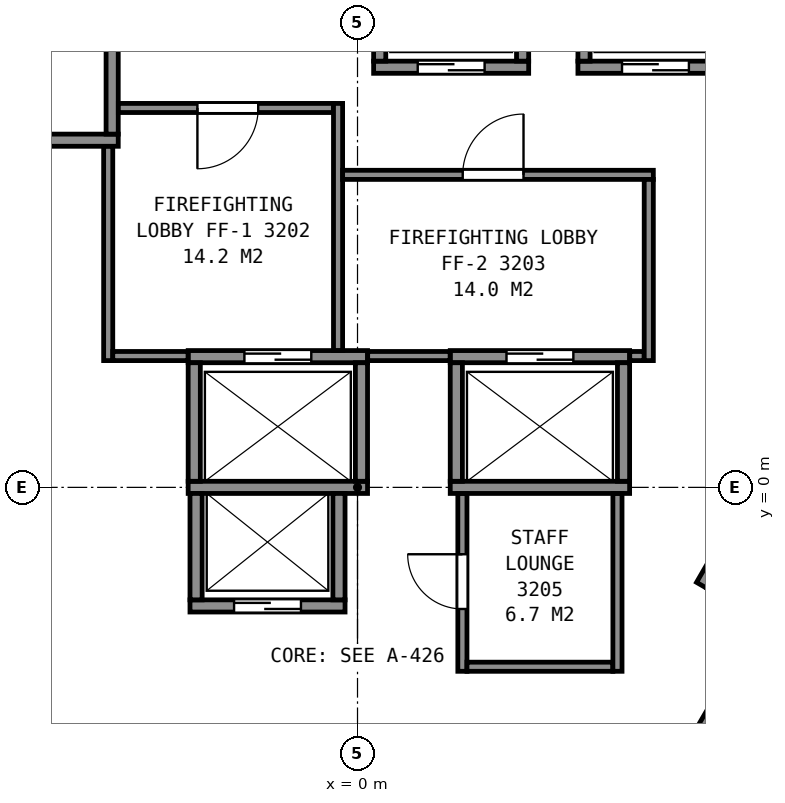
"""IFC4 building model, lengths in metres.
Left out: names, types, materials, properties, quantities, classifications, styles, units other than length and angle.
Written with IfcOpenShell. Run it as: python <this file> out.ifc"""

import sys

from ifc_helpers import new_model, si_unit, direction, frame, frame_2d, origin, place, context, subcontext, project, spatial, rectangle, extrude, element, fill, save


model = new_model("IFC4")
c1 = context("Model", 3, precision=1e-05, world=origin(), true_north=direction((0.0, 1.0)))
c2 = subcontext(c1, "Body", "Model", "MODEL_VIEW")
j1 = project(units=[si_unit("LENGTHUNIT", "METRE"), si_unit("PLANEANGLEUNIT", "RADIAN")], contexts=[c1])
p1 = place(None, origin())
s1 = spatial("IfcSite", under=j1, at=p1, CompositionType="ELEMENT")
p2 = place(p1, origin())
s2 = spatial("IfcBuilding", under=s1, at=p2, CompositionType="ELEMENT")
p3 = place(p2, frame((0.0, 0.0, 132.4)))
s3 = spatial("IfcBuildingStorey", under=s2, at=p3, CompositionType="ELEMENT", Elevation=132.4)
p4 = place(p3, frame((-2.755, -1.95, 0.0), z_axis=(0.0, 0.0, 1.0), x_axis=(1.0, 0.0, 0.0)))
e1 = element("IfcWall", 1, at=p4, inside=s3, PredefinedType="PARTITIONING", context=c2, shape_type="SweptSolid", body=[
    extrude(rectangle(XDim=2.55, YDim=0.2, at=frame_2d((1.275, 0.0))), origin(), (0.0, 0.0, 1.0), 3.6),
])
p5 = place(p4, frame((0.725, 0.0, 0.0)))
e2 = element("IfcOpeningElement", 2, at=p5, cuts=e1, PredefinedType="OPENING", context=c2, shape_type="SweptSolid", body=[
    extrude(rectangle(XDim=1.1, YDim=2.1, at=frame_2d((0.55, 1.05))), frame((0.0, 0.11, 0.0), z_axis=(0.0, -1.0, 0.0), x_axis=(1.0, 0.0, 0.0)), (0.0, 0.0, 1.0), 0.22),
])
p6 = place(p3, frame((-2.785, 0.0, 0.0), z_axis=(0.0, 0.0, 1.0), x_axis=(1.0, 0.0, 0.0)))
e3 = element("IfcWall", 3, at=p6, inside=s3, PredefinedType="PARTITIONING", context=c2, shape_type="SweptSolid", body=[
    extrude(rectangle(XDim=2.95, YDim=0.2, at=frame_2d((1.475, 0.0))), origin(), (0.0, 0.0, 1.0), 3.6),
])
p7 = place(p3, frame((1.525, 0.0, 0.0), z_axis=(0.0, 0.0, 1.0), x_axis=(1.0, 0.0, 0.0)))
e4 = element("IfcWall", 4, at=p7, inside=s3, PredefinedType="PARTITIONING", context=c2, shape_type="SweptSolid", body=[
    extrude(rectangle(XDim=2.95, YDim=0.2, at=frame_2d((1.475, 0.0))), origin(), (0.0, 0.0, 1.0), 3.6),
])
p8 = place(p3, frame((-2.785, 2.15, 0.0), z_axis=(0.0, 0.0, 1.0), x_axis=(1.0, 0.0, 0.0)))
e5 = element("IfcWall", 5, at=p8, inside=s3, PredefinedType="PARTITIONING", context=c2, shape_type="SweptSolid", body=[
    extrude(rectangle(XDim=2.95, YDim=0.2, at=frame_2d((1.475, 0.0))), origin(), (0.0, 0.0, 1.0), 3.6),
])
p9 = place(p8, frame((0.925, 0.0, 0.0)))
e6 = element("IfcOpeningElement", 6, at=p9, cuts=e5, PredefinedType="OPENING", context=c2, shape_type="SweptSolid", body=[
    extrude(rectangle(XDim=1.1, YDim=2.1, at=frame_2d((0.55, 1.05))), frame((0.0, 0.11, 0.0), z_axis=(0.0, -1.0, 0.0), x_axis=(1.0, 0.0, 0.0)), (0.0, 0.0, 1.0), 0.22),
])
p10 = place(p3, frame((1.525, 2.15, 0.0), z_axis=(0.0, 0.0, 1.0), x_axis=(1.0, 0.0, 0.0)))
e7 = element("IfcWall", 7, at=p10, inside=s3, PredefinedType="PARTITIONING", context=c2, shape_type="SweptSolid", body=[
    extrude(rectangle(XDim=2.95, YDim=0.2, at=frame_2d((1.475, 0.0))), origin(), (0.0, 0.0, 1.0), 3.6),
])
p11 = place(p10, frame((0.925, 0.0, 0.0)))
e8 = element("IfcOpeningElement", 8, at=p11, cuts=e7, PredefinedType="OPENING", context=c2, shape_type="SweptSolid", body=[
    extrude(rectangle(XDim=1.1, YDim=2.1, at=frame_2d((0.55, 1.05))), frame((0.0, 0.11, 0.0), z_axis=(0.0, -1.0, 0.0), x_axis=(1.0, 0.0, 0.0)), (0.0, 0.0, 1.0), 0.22),
])
p12 = place(p3, frame((-6.285, 5.71, 0.0), z_axis=(0.0, 0.0, 1.0), x_axis=(1.0, 0.0, 0.0)))
e9 = element("IfcWall", 9, at=p12, inside=s3, PredefinedType="PARTITIONING", context=c2, shape_type="SweptSolid", body=[
    extrude(rectangle(XDim=2.35, YDim=0.2, at=frame_2d((1.175, 0.0))), origin(), (0.0, 0.0, 1.0), 3.6),
])
p13 = place(p3, frame((0.265, 6.91, 0.0), z_axis=(0.0, 0.0, 1.0), x_axis=(1.0, 0.0, 0.0)))
e10 = element("IfcWall", 10, at=p13, inside=s3, PredefinedType="PARTITIONING", context=c2, shape_type="SweptSolid", body=[
    extrude(rectangle(XDim=2.55, YDim=0.2, at=frame_2d((1.275, 0.0))), origin(), (0.0, 0.0, 1.0), 3.6),
])
p14 = place(p13, frame((0.725, 0.0, 0.0)))
e11 = element("IfcOpeningElement", 11, at=p14, cuts=e10, PredefinedType="OPENING", context=c2, shape_type="SweptSolid", body=[
    extrude(rectangle(XDim=1.1, YDim=2.1, at=frame_2d((0.55, 1.05))), frame((0.0, 0.11, 0.0), z_axis=(0.0, -1.0, 0.0), x_axis=(1.0, 0.0, 0.0)), (0.0, 0.0, 1.0), 0.22),
])
p15 = place(p3, frame((3.625, 6.91, 0.0), z_axis=(0.0, 0.0, 1.0), x_axis=(1.0, 0.0, 0.0)))
e12 = element("IfcWall", 12, at=p15, inside=s3, PredefinedType="PARTITIONING", context=c2, shape_type="SweptSolid", body=[
    extrude(rectangle(XDim=2.55, YDim=0.2, at=frame_2d((1.275, 0.0))), origin(), (0.0, 0.0, 1.0), 3.6),
])
p16 = place(p15, frame((0.725, 0.0, 0.0)))
e13 = element("IfcOpeningElement", 13, at=p16, cuts=e12, PredefinedType="OPENING", context=c2, shape_type="SweptSolid", body=[
    extrude(rectangle(XDim=1.1, YDim=2.1, at=frame_2d((0.55, 1.05))), frame((0.0, 0.11, 0.0), z_axis=(0.0, -1.0, 0.0), x_axis=(1.0, 0.0, 0.0)), (0.0, 0.0, 1.0), 0.22),
])
p17 = place(p3, frame((5.527, -4.247, 0.0), z_axis=(0.0, 0.0, 1.0), x_axis=(0.499938297808, 0.866061024631, 0.0)))
e14 = element("IfcWall", 14, at=p17, inside=s3, PredefinedType="PARTITIONING", context=c2, shape_type="SweptSolid", body=[
    extrude(rectangle(XDim=2.35, YDim=0.2, at=frame_2d((1.175, 0.0))), origin(), (0.0, 0.0, 1.0), 3.6),
])
p18 = place(p17, frame((0.725, 0.0, 0.0)))
e15 = element("IfcOpeningElement", 15, at=p18, cuts=e14, PredefinedType="OPENING", context=c2, shape_type="SweptSolid", body=[
    extrude(rectangle(XDim=1.1, YDim=2.1, at=frame_2d((0.55, 1.05))), frame((0.0, 0.11, 0.0), z_axis=(0.0, -1.0, 0.0), x_axis=(1.0, 0.0, 0.0)), (0.0, 0.0, 1.0), 0.22),
])
p19 = place(p3, frame((5.663, -1.612, 0.0), z_axis=(0.0, 0.0, 1.0), x_axis=(0.49998122708, 0.866036242063, 0.0)))
e16 = element("IfcWall", 16, at=p19, inside=s3, PredefinedType="PARTITIONING", context=c2, shape_type="SweptSolid", body=[
    extrude(rectangle(XDim=4.9, YDim=0.2, at=frame_2d((2.45, 0.0))), origin(), (0.0, 0.0, 1.0), 3.6),
])
p20 = place(p3, frame((4.375, 0.1, 0.0), z_axis=(0.0, 0.0, 1.0), x_axis=(0.0, 1.0, 0.0)))
e17 = element("IfcWall", 17, at=p20, inside=s3, PredefinedType="PARTITIONING", context=c2, shape_type="SweptSolid", body=[
    extrude(rectangle(XDim=1.95, YDim=0.2, at=frame_2d((0.975, 0.0))), origin(), (0.0, 0.0, 1.0), 3.6),
])
for number, where, z_axis, x_axis in (
    (18, (3.725, 7.01, 0.0), (0.0, 0.0, 1.0), (0.0, 1.0, 0.0)),
    (19, (2.715, 7.01, 0.0), (0.0, 0.0, 1.0), (0.0, 1.0, 0.0)),
):
    element("IfcWall", number, at=place(p3, frame(where, z_axis=z_axis, x_axis=x_axis)), inside=s3, PredefinedType="PARTITIONING", context=c2, shape_type="SweptSolid", body=[
        extrude(rectangle(XDim=1.75, YDim=0.2, at=frame_2d((0.875, 0.0))), origin(), (0.0, 0.0, 1.0), 3.6),
    ])
p21 = place(p3, frame((1.625, 0.1, 0.0), z_axis=(0.0, 0.0, 1.0), x_axis=(0.0, 1.0, 0.0)))
e20 = element("IfcWall", 20, at=p21, inside=s3, PredefinedType="PARTITIONING", context=c2, shape_type="SweptSolid", body=[
    extrude(rectangle(XDim=1.95, YDim=0.2, at=frame_2d((0.975, 0.0))), origin(), (0.0, 0.0, 1.0), 3.6),
])
p22 = place(p3, frame((0.365, 7.01, 0.0), z_axis=(0.0, 0.0, 1.0), x_axis=(0.0, 1.0, 0.0)))
e21 = element("IfcWall", 21, at=p22, inside=s3, PredefinedType="PARTITIONING", context=c2, shape_type="SweptSolid", body=[
    extrude(rectangle(XDim=1.75, YDim=0.2, at=frame_2d((0.875, 0.0))), origin(), (0.0, 0.0, 1.0), 3.6),
])
p23 = place(p3, frame((0.065, 0.1, 0.0), z_axis=(0.0, 0.0, 1.0), x_axis=(0.0, 1.0, 0.0)))
e22 = element("IfcWall", 22, at=p23, inside=s3, PredefinedType="PARTITIONING", context=c2, shape_type="SweptSolid", body=[
    extrude(rectangle(XDim=1.95, YDim=0.2, at=frame_2d((0.975, 0.0))), origin(), (0.0, 0.0, 1.0), 3.6),
])
for number, where, z_axis, x_axis in (
    (23, (-0.305, -1.85, 0.0), (0.0, 0.0, 1.0), (0.0, 1.0, 0.0)),
    (24, (-2.655, -1.85, 0.0), (0.0, 0.0, 1.0), (0.0, 1.0, 0.0)),
):
    element("IfcWall", number, at=place(p3, frame(where, z_axis=z_axis, x_axis=x_axis)), inside=s3, PredefinedType="PARTITIONING", context=c2, shape_type="SweptSolid", body=[
        extrude(rectangle(XDim=1.75, YDim=0.2, at=frame_2d((0.875, 0.0))), origin(), (0.0, 0.0, 1.0), 3.6),
    ])
p24 = place(p3, frame((-2.685, 0.1, 0.0), z_axis=(0.0, 0.0, 1.0), x_axis=(0.0, 1.0, 0.0)))
e25 = element("IfcWall", 25, at=p24, inside=s3, PredefinedType="PARTITIONING", context=c2, shape_type="SweptSolid", body=[
    extrude(rectangle(XDim=1.95, YDim=0.2, at=frame_2d((0.975, 0.0))), origin(), (0.0, 0.0, 1.0), 3.6),
])
p25 = place(p3, frame((-4.035, 5.81, 0.0), z_axis=(0.0, 0.0, 1.0), x_axis=(0.0, 1.0, 0.0)))
e26 = element("IfcWall", 26, at=p25, inside=s3, PredefinedType="PARTITIONING", context=c2, shape_type="SweptSolid", body=[
    extrude(rectangle(XDim=1.75, YDim=0.2, at=frame_2d((0.875, 0.0))), origin(), (0.0, 0.0, 1.0), 3.6),
])
p26 = place(p3, frame((-13.664, 5.946, 0.0), z_axis=(0.0, 0.0, 1.0), x_axis=(0.499994327219, -0.866028678941, 0.0)))
e27 = element("IfcWall", 27, at=p26, inside=s3, PredefinedType="PARTITIONING", context=c2, shape_type="SweptSolid", body=[
    extrude(rectangle(XDim=23.968, YDim=0.2, at=frame_2d((11.984, 0.0))), origin(), (0.0, 0.0, 1.0), 3.35),
])
p27 = place(p3, frame((-4.152, -5.729, 0.0), z_axis=(0.0, 0.0, 1.0), x_axis=(-0.500024287448, 0.866011380966, 0.0)))
e28 = element("IfcWall", 28, at=p27, inside=s3, PredefinedType="PARTITIONING", context=c2, shape_type="SweptSolid", body=[
    extrude(rectangle(XDim=3.501, YDim=0.15, at=frame_2d((1.75, 0.0))), origin(), (0.0, 0.0, 1.0), 3.35),
])
p28 = place(p27, frame((2.026, 0.0, 0.0)))
e29 = element("IfcOpeningElement", 29, at=p28, cuts=e28, PredefinedType="OPENING", context=c2, shape_type="SweptSolid", body=[
    extrude(rectangle(XDim=0.9, YDim=2.1, at=frame_2d((0.45, 1.05))), frame((0.0, 0.085, 0.0), z_axis=(0.0, -1.0, 0.0), x_axis=(1.0, 0.0, 0.0)), (0.0, 0.0, 1.0), 0.17),
])
p29 = place(p27, frame((0.248, 0.0, 0.0)))
e30 = element("IfcOpeningElement", 30, at=p29, cuts=e28, PredefinedType="OPENING", context=c2, shape_type="SweptSolid", body=[
    extrude(rectangle(XDim=0.9, YDim=2.1, at=frame_2d((0.45, 1.05))), frame((0.0, 0.085, 0.0), z_axis=(0.0, -1.0, 0.0), x_axis=(1.0, 0.0, 0.0)), (0.0, 0.0, 1.0), 0.17),
])
p30 = place(p3, frame((-4.1, 2.085, 0.0), z_axis=(0.0, 0.0, 1.0), x_axis=(0.0, 1.0, 0.0)))
e31 = element("IfcWall", 31, at=p30, inside=s3, PredefinedType="PARTITIONING", context=c2, shape_type="SweptSolid", body=[
    extrude(rectangle(XDim=3.523, YDim=0.15, at=frame_2d((1.761, 0.0))), origin(), (0.0, 0.0, 1.0), 3.35),
])
p31 = place(p3, frame((-4.025, 2.16, 0.0), z_axis=(0.0, 0.0, 1.0), x_axis=(1.0, 0.0, 0.0)))
e32 = element("IfcWall", 32, at=p31, inside=s3, PredefinedType="PARTITIONING", context=c2, shape_type="SweptSolid", body=[
    extrude(rectangle(XDim=1.238, YDim=0.15, at=frame_2d((0.619, 0.0))), origin(), (0.0, 0.0, 1.0), 3.35),
])
p32 = place(p3, frame((-3.933, 6.24, 0.0), z_axis=(0.0, 0.0, 1.0), x_axis=(1.0, 0.0, 0.0)))
e33 = element("IfcWall", 33, at=p32, inside=s3, PredefinedType="PARTITIONING", context=c2, shape_type="SweptSolid", body=[
    extrude(rectangle(XDim=3.538, YDim=0.15, at=frame_2d((1.769, 0.0))), origin(), (0.0, 0.0, 1.0), 3.35),
])
p33 = place(p32, frame((1.3, 0.0, 0.0)))
e34 = element("IfcOpeningElement", 34, at=p33, cuts=e33, PredefinedType="OPENING", context=c2, shape_type="SweptSolid", body=[
    extrude(rectangle(XDim=1.0, YDim=2.1, at=frame_2d((0.5, 1.05))), frame((0.0, 0.085, 0.0), z_axis=(0.0, -1.0, 0.0), x_axis=(1.0, 0.0, 0.0)), (0.0, 0.0, 1.0), 0.17),
])
p34 = place(p3, frame((-0.32, 2.252, 0.0), z_axis=(0.0, 0.0, 1.0), x_axis=(0.0, 1.0, 0.0)))
e35 = element("IfcWall", 35, at=p34, inside=s3, PredefinedType="PARTITIONING", context=c2, shape_type="SweptSolid", body=[
    extrude(rectangle(XDim=4.063, YDim=0.15, at=frame_2d((2.031, 0.0))), origin(), (0.0, 0.0, 1.0), 3.35),
])
p35 = place(p3, frame((-0.245, 5.14, 0.0), z_axis=(0.0, 0.0, 1.0), x_axis=(1.0, 0.0, 0.0)))
e36 = element("IfcWall", 36, at=p35, inside=s3, PredefinedType="PARTITIONING", context=c2, shape_type="SweptSolid", body=[
    extrude(rectangle(XDim=5.11, YDim=0.15, at=frame_2d((2.555, 0.0))), origin(), (0.0, 0.0, 1.0), 3.35),
])
p36 = place(p35, frame((1.975, 0.0, 0.0)))
e37 = element("IfcOpeningElement", 37, at=p36, cuts=e36, PredefinedType="OPENING", context=c2, shape_type="SweptSolid", body=[
    extrude(rectangle(XDim=1.0, YDim=2.1, at=frame_2d((0.5, 1.05))), frame((0.0, 0.085, 0.0), z_axis=(0.0, -1.0, 0.0), x_axis=(1.0, 0.0, 0.0)), (0.0, 0.0, 1.0), 0.17),
])
p37 = place(p3, frame((0.167, 2.16, 0.0), z_axis=(0.0, 0.0, 1.0), x_axis=(1.0, 0.0, 0.0)))
e38 = element("IfcWall", 38, at=p37, inside=s3, PredefinedType="PARTITIONING", context=c2, shape_type="SweptSolid", body=[
    extrude(rectangle(XDim=1.356, YDim=0.15, at=frame_2d((0.678, 0.0))), origin(), (0.0, 0.0, 1.0), 3.35),
])
p38 = place(p3, frame((1.725, -0.102, 0.0), z_axis=(0.0, 0.0, 1.0), x_axis=(0.0, -1.0, 0.0)))
e39 = element("IfcWall", 39, at=p38, inside=s3, PredefinedType="PARTITIONING", context=c2, shape_type="SweptSolid", body=[
    extrude(rectangle(XDim=2.923, YDim=0.15, at=frame_2d((1.461, 0.0))), origin(), (0.0, 0.0, 1.0), 3.35),
])
p39 = place(p38, frame((0.998, 0.0, 0.0)))
e40 = element("IfcOpeningElement", 40, at=p39, cuts=e39, PredefinedType="OPENING", context=c2, shape_type="SweptSolid", body=[
    extrude(rectangle(XDim=0.9, YDim=2.1, at=frame_2d((0.45, 1.05))), frame((0.0, 0.085, 0.0), z_axis=(0.0, -1.0, 0.0), x_axis=(1.0, 0.0, 0.0)), (0.0, 0.0, 1.0), 0.17),
])
p40 = place(p3, frame((1.8, -2.95, 0.0), z_axis=(0.0, 0.0, 1.0), x_axis=(1.0, 0.0, 0.0)))
e41 = element("IfcWall", 41, at=p40, inside=s3, PredefinedType="PARTITIONING", context=c2, shape_type="SweptSolid", body=[
    extrude(rectangle(XDim=2.4, YDim=0.15, at=frame_2d((1.2, 0.0))), origin(), (0.0, 0.0, 1.0), 3.35),
])
p41 = place(p3, frame((4.275, -3.025, 0.0), z_axis=(0.0, 0.0, 1.0), x_axis=(0.0, 1.0, 0.0)))
e42 = element("IfcWall", 42, at=p41, inside=s3, PredefinedType="PARTITIONING", context=c2, shape_type="SweptSolid", body=[
    extrude(rectangle(XDim=2.923, YDim=0.15, at=frame_2d((1.461, 0.0))), origin(), (0.0, 0.0, 1.0), 3.35),
])
p42 = place(p3, frame((4.477, 2.16, 0.0), z_axis=(0.0, 0.0, 1.0), x_axis=(1.0, 0.0, 0.0)))
e43 = element("IfcWall", 43, at=p42, inside=s3, PredefinedType="PARTITIONING", context=c2, shape_type="SweptSolid", body=[
    extrude(rectangle(XDim=0.238, YDim=0.15, at=frame_2d((0.119, 0.0))), origin(), (0.0, 0.0, 1.0), 3.35),
])
p43 = place(p3, frame((4.79, 2.085, 0.0), z_axis=(0.0, 0.0, 1.0), x_axis=(0.0, 1.0, 0.0)))
e44 = element("IfcWall", 44, at=p43, inside=s3, PredefinedType="PARTITIONING", context=c2, shape_type="SweptSolid", body=[
    extrude(rectangle(XDim=2.98, YDim=0.15, at=frame_2d((1.49, 0.0))), origin(), (0.0, 0.0, 1.0), 3.35),
])
p44 = place(p3, frame((-3.756, -15.816, 0.0), z_axis=(0.0, 0.0, 1.0), x_axis=(-0.499992829944, 0.866029543379, 0.0)))
e45 = element("IfcWall", 45, at=p44, inside=s3, PredefinedType="PARTITIONING", context=c2, shape_type="SweptSolid", body=[
    extrude(rectangle(XDim=24.413, YDim=0.125, at=frame_2d((12.207, 0.0))), origin(), (0.0, 0.0, 1.0), 2.613),
])
p45 = place(p44, frame((20.478, 0.0, 0.0)))
e46 = element("IfcOpeningElement", 46, at=p45, cuts=e45, PredefinedType="OPENING", context=c2, shape_type="SweptSolid", body=[
    extrude(rectangle(XDim=1.0, YDim=2.1, at=frame_2d((0.5, 1.05))), frame((0.0, 0.073, 0.0), z_axis=(0.0, -1.0, 0.0), x_axis=(1.0, 0.0, 0.0)), (0.0, 0.0, 1.0), 0.145),
])
p46 = place(p44, frame((5.99, 0.0, 0.0)))
e47 = element("IfcOpeningElement", 47, at=p46, cuts=e45, PredefinedType="OPENING", context=c2, shape_type="SweptSolid", body=[
    extrude(rectangle(XDim=1.0, YDim=2.1, at=frame_2d((0.5, 1.05))), frame((0.0, 0.073, 0.0), z_axis=(0.0, -1.0, 0.0), x_axis=(1.0, 0.0, 0.0)), (0.0, 0.0, 1.0), 0.145),
])
p47 = place(p44, frame((1.561, 0.0, 0.0)))
e48 = element("IfcOpeningElement", 48, at=p47, cuts=e45, PredefinedType="OPENING", context=c2, shape_type="SweptSolid", body=[
    extrude(rectangle(XDim=1.0, YDim=2.1, at=frame_2d((0.5, 1.05))), frame((0.0, 0.073, 0.0), z_axis=(0.0, -1.0, 0.0), x_axis=(1.0, 0.0, 0.0)), (0.0, 0.0, 1.0), 0.145),
])
p48 = place(p3, frame((15.962, 5.326, 0.0), z_axis=(0.0, 0.0, 1.0), x_axis=(-0.499992829944, -0.866029543379, 0.0)))
e49 = element("IfcWall", 49, at=p48, inside=s3, PredefinedType="PARTITIONING", context=c2, shape_type="SweptSolid", body=[
    extrude(rectangle(XDim=24.413, YDim=0.125, at=frame_2d((12.207, 0.0))), origin(), (0.0, 0.0, 1.0), 2.613),
])
p49 = place(p48, frame((21.258, 0.0, 0.0)))
e50 = element("IfcOpeningElement", 50, at=p49, cuts=e49, PredefinedType="OPENING", context=c2, shape_type="SweptSolid", body=[
    extrude(rectangle(XDim=0.9, YDim=2.1, at=frame_2d((0.45, 1.05))), frame((0.0, 0.073, 0.0), z_axis=(0.0, -1.0, 0.0), x_axis=(1.0, 0.0, 0.0)), (0.0, 0.0, 1.0), 0.145),
])
p50 = place(p48, frame((18.502, 0.0, 0.0)))
e51 = element("IfcOpeningElement", 51, at=p50, cuts=e49, PredefinedType="OPENING", context=c2, shape_type="SweptSolid", body=[
    extrude(rectangle(XDim=0.9, YDim=2.1, at=frame_2d((0.45, 1.05))), frame((0.0, 0.073, 0.0), z_axis=(0.0, -1.0, 0.0), x_axis=(1.0, 0.0, 0.0)), (0.0, 0.0, 1.0), 0.145),
])
p51 = place(p48, frame((11.799, 0.0, 0.0)))
e52 = element("IfcOpeningElement", 52, at=p51, cuts=e49, PredefinedType="OPENING", context=c2, shape_type="SweptSolid", body=[
    extrude(rectangle(XDim=0.9, YDim=2.1, at=frame_2d((0.45, 1.05))), frame((0.0, 0.073, 0.0), z_axis=(0.0, -1.0, 0.0), x_axis=(1.0, 0.0, 0.0)), (0.0, 0.0, 1.0), 0.145),
])
p52 = place(p48, frame((9.043, 0.0, 0.0)))
e53 = element("IfcOpeningElement", 53, at=p52, cuts=e49, PredefinedType="OPENING", context=c2, shape_type="SweptSolid", body=[
    extrude(rectangle(XDim=0.9, YDim=2.1, at=frame_2d((0.45, 1.05))), frame((0.0, 0.073, 0.0), z_axis=(0.0, -1.0, 0.0), x_axis=(1.0, 0.0, 0.0)), (0.0, 0.0, 1.0), 0.145),
])
p53 = place(p48, frame((1.99, 0.0, 0.0)))
e54 = element("IfcOpeningElement", 54, at=p53, cuts=e49, PredefinedType="OPENING", context=c2, shape_type="SweptSolid", body=[
    extrude(rectangle(XDim=0.9, YDim=2.1, at=frame_2d((0.45, 1.05))), frame((0.0, 0.073, 0.0), z_axis=(0.0, -1.0, 0.0), x_axis=(1.0, 0.0, 0.0)), (0.0, 0.0, 1.0), 0.145),
])
p54 = place(p14, origin())
e55 = element("IfcDoor", 55, at=p54, inside=s3, OperationType="SLIDING_TO_LEFT", PredefinedType="DOOR", context=c2, shape_type="SweptSolid", body=[
    extrude(rectangle(XDim=1.1, YDim=2.1, at=frame_2d((0.55, 1.05))), frame((0.0, 0.025, 0.0), z_axis=(0.0, -1.0, 0.0), x_axis=(1.0, 0.0, 0.0)), (0.0, 0.0, 1.0), 0.05),
])
fill(e11, e55)
p55 = place(p5, origin())
e56 = element("IfcDoor", 56, at=p55, inside=s3, OperationType="SLIDING_TO_RIGHT", PredefinedType="DOOR", context=c2, shape_type="SweptSolid", body=[
    extrude(rectangle(XDim=1.1, YDim=2.1, at=frame_2d((0.55, 1.05))), frame((0.0, 0.025, 0.0), z_axis=(0.0, -1.0, 0.0), x_axis=(1.0, 0.0, 0.0)), (0.0, 0.0, 1.0), 0.05),
])
fill(e2, e56)
p56 = place(p16, origin())
e57 = element("IfcDoor", 57, at=p56, inside=s3, OperationType="SLIDING_TO_LEFT", PredefinedType="DOOR", context=c2, shape_type="SweptSolid", body=[
    extrude(rectangle(XDim=1.1, YDim=2.1, at=frame_2d((0.55, 1.05))), frame((0.0, 0.025, 0.0), z_axis=(0.0, -1.0, 0.0), x_axis=(1.0, 0.0, 0.0)), (0.0, 0.0, 1.0), 0.05),
])
fill(e13, e57)
p57 = place(p9, origin())
e58 = element("IfcDoor", 58, at=p57, inside=s3, OperationType="SLIDING_TO_LEFT", PredefinedType="DOOR", context=c2, shape_type="SweptSolid", body=[
    extrude(rectangle(XDim=1.1, YDim=2.1, at=frame_2d((0.55, 1.05))), frame((0.0, 0.025, 0.0), z_axis=(0.0, -1.0, 0.0), x_axis=(1.0, 0.0, 0.0)), (0.0, 0.0, 1.0), 0.05),
])
fill(e6, e58)
p58 = place(p11, origin())
e59 = element("IfcDoor", 59, at=p58, inside=s3, OperationType="SLIDING_TO_RIGHT", PredefinedType="DOOR", context=c2, shape_type="SweptSolid", body=[
    extrude(rectangle(XDim=1.1, YDim=2.1, at=frame_2d((0.55, 1.05))), frame((0.0, 0.025, 0.0), z_axis=(0.0, -1.0, 0.0), x_axis=(1.0, 0.0, 0.0)), (0.0, 0.0, 1.0), 0.05),
])
fill(e8, e59)
p59 = place(p33, origin())
e60 = element("IfcDoor", 60, at=p59, inside=s3, OperationType="SINGLE_SWING_LEFT", PredefinedType="DOOR", context=c2, shape_type="SweptSolid", body=[
    extrude(rectangle(XDim=1.0, YDim=2.1, at=frame_2d((0.5, 1.05))), frame((0.0, 0.025, 0.0), z_axis=(0.0, -1.0, 0.0), x_axis=(1.0, 0.0, 0.0)), (0.0, 0.0, 1.0), 0.05),
])
fill(e34, e60)
p60 = place(p36, origin())
e61 = element("IfcDoor", 61, at=p60, inside=s3, OperationType="SINGLE_SWING_RIGHT", PredefinedType="DOOR", context=c2, shape_type="SweptSolid", body=[
    extrude(rectangle(XDim=1.0, YDim=2.1, at=frame_2d((0.5, 1.05))), frame((0.0, 0.025, 0.0), z_axis=(0.0, -1.0, 0.0), x_axis=(1.0, 0.0, 0.0)), (0.0, 0.0, 1.0), 0.05),
])
fill(e37, e61)
p61 = place(p39, origin())
e62 = element("IfcDoor", 62, at=p61, inside=s3, OperationType="SINGLE_SWING_LEFT", PredefinedType="DOOR", context=c2, shape_type="SweptSolid", body=[
    extrude(rectangle(XDim=0.9, YDim=2.1, at=frame_2d((0.45, 1.05))), frame((0.0, 0.025, 0.0), z_axis=(0.0, -1.0, 0.0), x_axis=(1.0, 0.0, 0.0)), (0.0, 0.0, 1.0), 0.05),
])
fill(e40, e62)
save(model, sys.argv[1])
